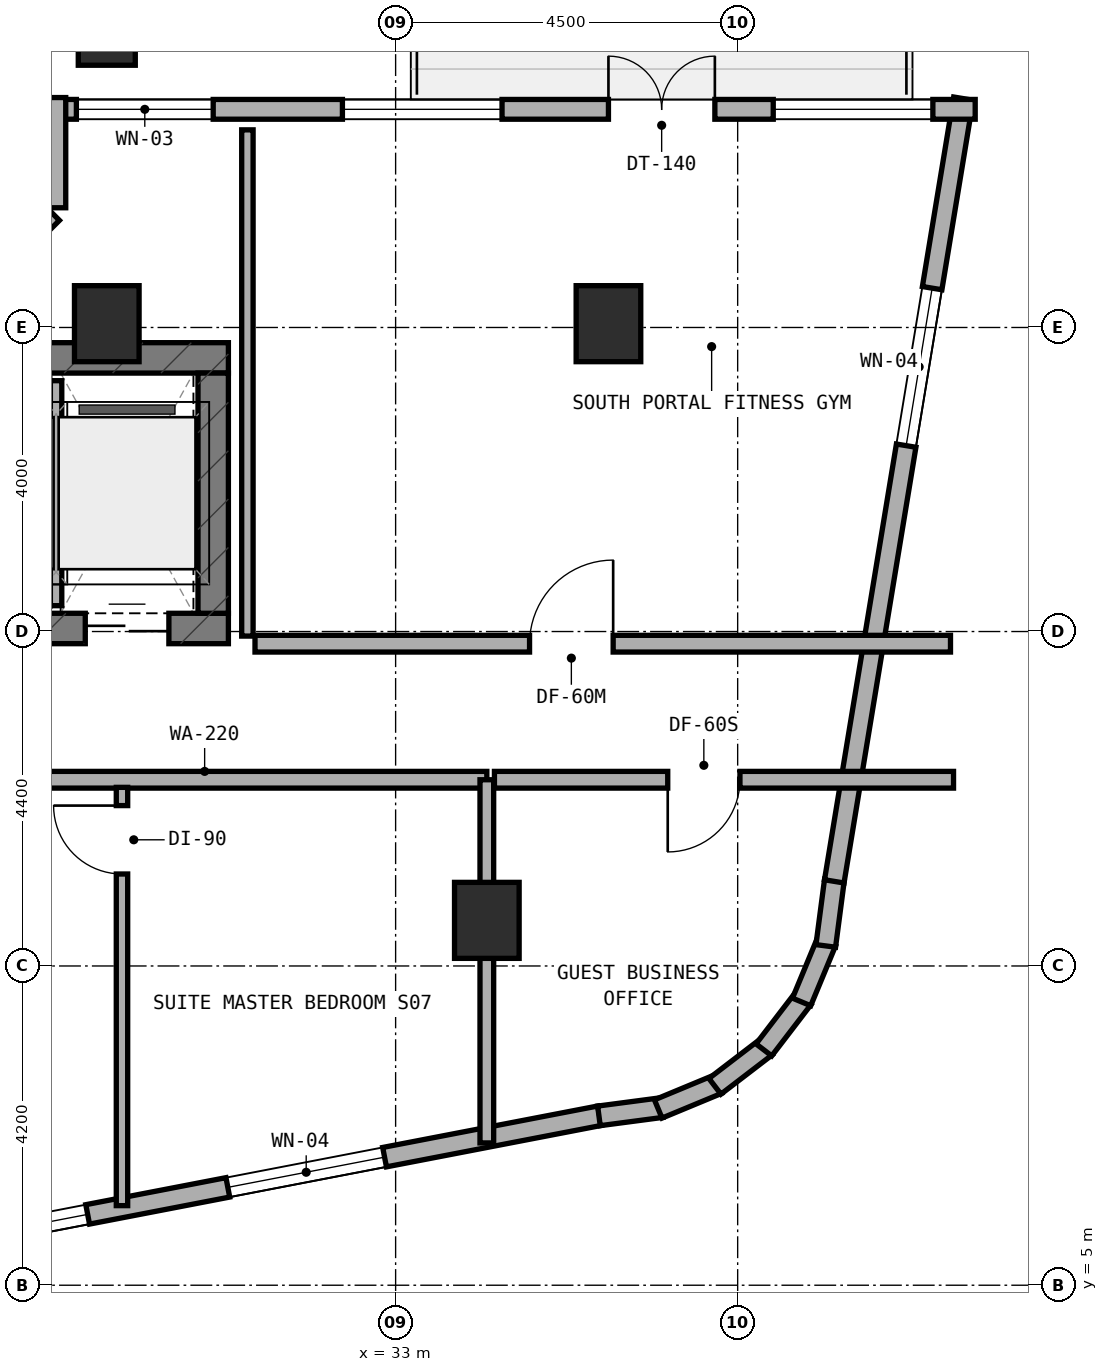
"""IFC4 building model, lengths in metres.
Left out: names, types, materials, properties, quantities, classifications, styles, units other than length and angle.
Written with IfcOpenShell. Run it as: python <this file> out.ifc"""

import sys

from ifc_helpers import new_model, si_unit, direction, frame, frame_2d, origin, origin_2d, place, context, subcontext, project, spatial, rectangle, extrude, element, fill, save


model = new_model("IFC4")
c1 = context("Model", 3, precision=1e-05, world=origin(), true_north=direction((0.0, 1.0)))
c2 = subcontext(c1, "Body", "Model", "MODEL_VIEW")
j1 = project(units=[si_unit("LENGTHUNIT", "METRE"), si_unit("PLANEANGLEUNIT", "RADIAN")], contexts=[c1])
p1 = place(None, origin())
s1 = spatial("IfcSite", under=j1, at=p1, CompositionType="ELEMENT")
p2 = place(p1, origin())
s2 = spatial("IfcBuilding", under=s1, at=p2, CompositionType="ELEMENT")
p3 = place(p2, frame((0.0, 0.0, 177.5)))
s3 = spatial("IfcBuildingStorey", under=s2, at=p3, CompositionType="ELEMENT", Elevation=177.5)
p4 = place(p3, frame((6.4, 13.64, 0.0), z_axis=(0.0, 0.0, 1.0), x_axis=(1.0, 0.0, 0.0)))
e1 = element("IfcWall", 1, at=p4, inside=s3, PredefinedType="SHEAR", context=c2, shape_type="SweptSolid", body=[
    extrude(rectangle(XDim=24.4, YDim=0.4, at=frame_2d((12.2, 0.0))), origin(), (0.0, 0.0, 1.0), 3.6),
])
p5 = place(p4, frame((9.15, 0.0, 0.0)))
e2 = element("IfcOpeningElement", 2, at=p5, cuts=e1, PredefinedType="OPENING", context=c2, shape_type="SweptSolid", body=[
    extrude(rectangle(XDim=1.2, YDim=2.15, at=frame_2d((0.6, 1.075))), frame((0.0, 0.21, 0.0), z_axis=(0.0, -1.0, 0.0), x_axis=(1.0, 0.0, 0.0)), (0.0, 0.0, 1.0), 0.42),
])
p6 = place(p4, frame((16.94, 0.0, 0.0)))
e3 = element("IfcOpeningElement", 3, at=p6, cuts=e1, PredefinedType="OPENING", context=c2, shape_type="SweptSolid", body=[
    extrude(rectangle(XDim=0.85, YDim=2.1, at=frame_2d((0.425, 1.05))), frame((0.0, 0.21, 0.0), z_axis=(0.0, -1.0, 0.0), x_axis=(1.0, 0.0, 0.0)), (0.0, 0.0, 1.0), 0.42),
])
p7 = place(p4, frame((18.783, 0.0, 0.0)))
e4 = element("IfcOpeningElement", 4, at=p7, cuts=e1, PredefinedType="OPENING", context=c2, shape_type="SweptSolid", body=[
    extrude(rectangle(XDim=1.1, YDim=2.15, at=frame_2d((0.55, 1.075))), frame((0.0, 0.21, 0.0), z_axis=(0.0, -1.0, 0.0), x_axis=(1.0, 0.0, 0.0)), (0.0, 0.0, 1.0), 0.42),
])
p8 = place(p4, frame((20.65, 0.0, 0.0)))
e5 = element("IfcOpeningElement", 5, at=p8, cuts=e1, PredefinedType="OPENING", context=c2, shape_type="SweptSolid", body=[
    extrude(rectangle(XDim=1.1, YDim=2.15, at=frame_2d((0.55, 1.075))), frame((0.0, 0.21, 0.0), z_axis=(0.0, -1.0, 0.0), x_axis=(1.0, 0.0, 0.0)), (0.0, 0.0, 1.0), 0.42),
])
p9 = place(p4, frame((22.517, 0.0, 0.0)))
e6 = element("IfcOpeningElement", 6, at=p9, cuts=e1, PredefinedType="OPENING", context=c2, shape_type="SweptSolid", body=[
    extrude(rectangle(XDim=1.1, YDim=2.15, at=frame_2d((0.55, 1.075))), frame((0.0, 0.21, 0.0), z_axis=(0.0, -1.0, 0.0), x_axis=(1.0, 0.0, 0.0)), (0.0, 0.0, 1.0), 0.42),
])
p10 = place(p3, frame((6.4, 17.2, 0.0), z_axis=(0.0, 0.0, 1.0), x_axis=(1.0, 0.0, 0.0)))
e7 = element("IfcWall", 7, at=p10, inside=s3, PredefinedType="SHEAR", context=c2, shape_type="SweptSolid", body=[
    extrude(rectangle(XDim=24.4, YDim=0.4, at=frame_2d((12.2, 0.0))), origin(), (0.0, 0.0, 1.0), 3.6),
])
p11 = place(p3, frame((30.6, 13.84, 0.0), z_axis=(0.0, 0.0, 1.0), x_axis=(0.0, 1.0, 0.0)))
e8 = element("IfcWall", 8, at=p11, inside=s3, PredefinedType="SHEAR", context=c2, shape_type="SweptSolid", body=[
    extrude(rectangle(XDim=3.16, YDim=0.4, at=frame_2d((1.58, 0.0))), origin(), (0.0, 0.0, 1.0), 3.6),
])
for number, where, z_axis, x_axis in (
    (9, (34.2, 9.8, 0.0), (0.0, 0.0, 1.0), (1.0, 0.0, 0.0)),
    (10, (35.8, 17.65, 0.0), (0.0, 0.0, 1.0), (1.0, 0.0, 0.0)),
    (11, (29.2, 17.65, 0.0), (0.0, 0.0, 1.0), (1.0, 0.0, 0.0)),
):
    element("IfcColumn", number, at=place(p3, frame(where, z_axis=z_axis, x_axis=x_axis)), inside=s3, PredefinedType="COLUMN", context=c2, shape_type="SweptSolid", body=[
        extrude(rectangle(XDim=0.85, YDim=1.0, at=origin_2d()), origin(), (0.0, 0.0, 1.0), 3.6),
    ])
p12 = place(p3, frame((29.2, 21.5, 0.0), z_axis=(0.0, 0.0, 1.0), x_axis=(1.0, 0.0, 0.0)))
e12 = element("IfcColumn", 12, at=p12, inside=s3, PredefinedType="COLUMN", context=c2, shape_type="SweptSolid", body=[
    extrude(rectangle(XDim=0.75, YDim=0.9, at=origin_2d()), origin(), (0.0, 0.0, 1.0), 3.6),
])
p13 = place(p3, frame((26.801, 5.518, 0.0), z_axis=(0.0, 0.0, 1.0), x_axis=(0.98192801022, 0.189254809039, 0.0)))
e13 = element("IfcWall", 13, at=p13, inside=s3, PredefinedType="STANDARD", context=c2, shape_type="SweptSolid", body=[
    extrude(rectangle(XDim=9.046, YDim=0.26, at=frame_2d((4.523, 0.0))), origin(), (0.0, 0.0, 1.0), 3.32),
])
p14 = place(p13, frame((0.387, 0.0, 0.85)))
e14 = element("IfcOpeningElement", 14, at=p14, cuts=e13, PredefinedType="OPENING", context=c2, shape_type="SweptSolid", body=[
    extrude(rectangle(XDim=1.8, YDim=1.5, at=frame_2d((0.9, 0.75))), frame((0.0, 0.14, 0.0), z_axis=(0.0, -1.0, 0.0), x_axis=(1.0, 0.0, 0.0)), (0.0, 0.0, 1.0), 0.28),
])
p15 = place(p13, frame((4.065, 0.0, 0.85)))
e15 = element("IfcOpeningElement", 15, at=p15, cuts=e13, PredefinedType="OPENING", context=c2, shape_type="SweptSolid", body=[
    extrude(rectangle(XDim=2.1, YDim=1.5, at=frame_2d((1.05, 0.75))), frame((0.0, 0.14, 0.0), z_axis=(0.0, -1.0, 0.0), x_axis=(1.0, 0.0, 0.0)), (0.0, 0.0, 1.0), 0.28),
])
p16 = place(p3, frame((35.675, 7.228, 0.0), z_axis=(0.0, 0.0, 1.0), x_axis=(0.99142134712, 0.130704676564, 0.0)))
e16 = element("IfcWall", 16, at=p16, inside=s3, PredefinedType="STANDARD", context=c2, shape_type="SweptSolid", body=[
    extrude(rectangle(XDim=0.833, YDim=0.26, at=frame_2d((0.417, 0.0))), origin(), (0.0, 0.0, 1.0), 3.32),
])
p17 = place(p3, frame((36.455, 7.319, 0.0), z_axis=(0.0, 0.0, 1.0), x_axis=(0.923712395518, 0.383086687796, 0.0)))
e17 = element("IfcWall", 17, at=p17, inside=s3, PredefinedType="STANDARD", context=c2, shape_type="SweptSolid", body=[
    extrude(rectangle(XDim=0.851, YDim=0.26, at=frame_2d((0.425, 0.0))), origin(), (0.0, 0.0, 1.0), 3.32),
])
for number, where, z_axis, x_axis in (
    (18, (37.201, 7.617, 0.0), (0.0, 0.0, 1.0), (0.794, 0.608, 0.0)),
    (19, (37.845, 8.096, 0.0), (0.0, 0.0, 1.0), (0.608, 0.794, 0.0)),
):
    element("IfcWall", number, at=place(p3, frame(where, z_axis=z_axis, x_axis=x_axis)), inside=s3, PredefinedType="STANDARD", context=c2, shape_type="SweptSolid", body=[
        extrude(rectangle(XDim=0.85, YDim=0.26, at=frame_2d((0.425, 0.0))), origin(), (0.0, 0.0, 1.0), 3.32),
    ])
p18 = place(p3, frame((38.341, 8.727, 0.0), z_axis=(0.0, 0.0, 1.0), x_axis=(0.383086687796, 0.923712395518, 0.0)))
e20 = element("IfcWall", 20, at=p18, inside=s3, PredefinedType="STANDARD", context=c2, shape_type="SweptSolid", body=[
    extrude(rectangle(XDim=0.851, YDim=0.26, at=frame_2d((0.425, 0.0))), origin(), (0.0, 0.0, 1.0), 3.32),
])
p19 = place(p3, frame((38.659, 9.464, 0.0), z_axis=(0.0, 0.0, 1.0), x_axis=(0.130192647656, 0.991488716273, 0.0)))
e21 = element("IfcWall", 21, at=p19, inside=s3, PredefinedType="STANDARD", context=c2, shape_type="SweptSolid", body=[
    extrude(rectangle(XDim=0.868, YDim=0.26, at=frame_2d((0.434, 0.0))), origin(), (0.0, 0.0, 1.0), 3.32),
])
p20 = place(p3, frame((38.771, 10.313, 0.0), z_axis=(0.0, 0.0, 1.0), x_axis=(0.16277908586, 0.986662540693, 0.0)))
e22 = element("IfcWall", 22, at=p20, inside=s3, PredefinedType="STANDARD", context=c2, shape_type="SweptSolid", body=[
    extrude(rectangle(XDim=10.437, YDim=0.26, at=frame_2d((5.219, 0.0))), origin(), (0.0, 0.0, 1.0), 3.32),
])
p21 = place(p20, frame((5.81, 0.0, 0.85)))
e23 = element("IfcOpeningElement", 23, at=p21, cuts=e22, PredefinedType="OPENING", context=c2, shape_type="SweptSolid", body=[
    extrude(rectangle(XDim=2.1, YDim=1.5, at=frame_2d((1.05, 0.75))), frame((0.0, 0.14, 0.0), z_axis=(0.0, -1.0, 0.0), x_axis=(1.0, 0.0, 0.0)), (0.0, 0.0, 1.0), 0.28),
])
p22 = place(p3, frame((40.625, 20.47, 0.0), z_axis=(0.0, 0.0, 1.0), x_axis=(-1.0, 0.0, 0.0)))
e24 = element("IfcWall", 24, at=p22, inside=s3, PredefinedType="STANDARD", context=c2, shape_type="SweptSolid", body=[
    extrude(rectangle(XDim=12.215, YDim=0.26, at=frame_2d((6.107, 0.0))), origin(), (0.0, 0.0, 1.0), 2.995),
])
p23 = place(p22, frame((3.425, 0.0, 0.0)))
e25 = element("IfcOpeningElement", 25, at=p23, cuts=e24, PredefinedType="OPENING", context=c2, shape_type="SweptSolid", body=[
    extrude(rectangle(XDim=1.4, YDim=2.15, at=frame_2d((0.7, 1.075))), frame((0.0, 0.14, 0.0), z_axis=(0.0, -1.0, 0.0), x_axis=(1.0, 0.0, 0.0)), (0.0, 0.0, 1.0), 0.28),
])
p24 = place(p22, frame((0.557, 0.0, 0.85)))
e26 = element("IfcOpeningElement", 26, at=p24, cuts=e24, PredefinedType="OPENING", context=c2, shape_type="SweptSolid", body=[
    extrude(rectangle(XDim=2.1, YDim=1.5, at=frame_2d((1.05, 0.75))), frame((0.0, 0.14, 0.0), z_axis=(0.0, -1.0, 0.0), x_axis=(1.0, 0.0, 0.0)), (0.0, 0.0, 1.0), 0.28),
])
p25 = place(p22, frame((6.225, 0.0, 0.85)))
e27 = element("IfcOpeningElement", 27, at=p25, cuts=e24, PredefinedType="OPENING", context=c2, shape_type="SweptSolid", body=[
    extrude(rectangle(XDim=2.1, YDim=1.5, at=frame_2d((1.05, 0.75))), frame((0.0, 0.14, 0.0), z_axis=(0.0, -1.0, 0.0), x_axis=(1.0, 0.0, 0.0)), (0.0, 0.0, 1.0), 0.28),
])
p26 = place(p22, frame((10.025, 0.0, 0.85)))
e28 = element("IfcOpeningElement", 28, at=p26, cuts=e24, PredefinedType="OPENING", context=c2, shape_type="SweptSolid", body=[
    extrude(rectangle(XDim=1.8, YDim=1.5, at=frame_2d((0.9, 0.75))), frame((0.0, 0.14, 0.0), z_axis=(0.0, -1.0, 0.0), x_axis=(1.0, 0.0, 0.0)), (0.0, 0.0, 1.0), 0.28),
])
p27 = place(p3, frame((28.53, 20.625, 0.0), z_axis=(0.0, 0.0, 1.0), x_axis=(0.0, -1.0, 0.0)))
e29 = element("IfcWall", 29, at=p27, inside=s3, PredefinedType="STANDARD", context=c2, shape_type="SweptSolid", body=[
    extrude(rectangle(XDim=1.45, YDim=0.26, at=frame_2d((0.725, 0.0))), origin(), (0.0, 0.0, 1.0), 3.32),
])
p28 = place(p3, frame((28.485, 19.101, 0.0), z_axis=(0.0, 0.0, 1.0), x_axis=(-0.707106781187, -0.707106781187, 0.0)))
e30 = element("IfcWall", 30, at=p28, inside=s3, PredefinedType="STANDARD", context=c2, shape_type="SweptSolid", body=[
    extrude(rectangle(XDim=2.493, YDim=0.26, at=frame_2d((1.247, 0.0))), origin(), (0.0, 0.0, 1.0), 3.32),
])
p29 = place(p28, frame((0.347, 0.0, 0.85)))
e31 = element("IfcOpeningElement", 31, at=p29, cuts=e30, PredefinedType="OPENING", context=c2, shape_type="SweptSolid", body=[
    extrude(rectangle(XDim=1.8, YDim=1.5, at=frame_2d((0.9, 0.75))), frame((0.0, 0.14, 0.0), z_axis=(0.0, -1.0, 0.0), x_axis=(1.0, 0.0, 0.0)), (0.0, 0.0, 1.0), 0.28),
])
p30 = place(p3, frame((28.533, 13.94, 0.0), z_axis=(0.0, 0.0, 1.0), x_axis=(0.0, 1.0, 0.0)))
e32 = element("IfcWall", 32, at=p30, inside=s3, PredefinedType="PARTITIONING", context=c2, shape_type="SweptSolid", body=[
    extrude(rectangle(XDim=2.96, YDim=0.15, at=frame_2d((1.48, 0.0))), origin(), (0.0, 0.0, 1.0), 2.995),
])
p31 = place(p3, frame((18.4, 11.65, 0.0), z_axis=(0.0, 0.0, 1.0), x_axis=(1.0, 0.0, 0.0)))
e33 = element("IfcWall", 33, at=p31, inside=s3, PredefinedType="SOLIDWALL", context=c2, shape_type="SweptSolid", body=[
    extrude(rectangle(XDim=15.8, YDim=0.22, at=frame_2d((7.9, 0.0))), origin(), (0.0, 0.0, 1.0), 2.995),
])
p32 = place(p31, frame((7.425, 0.0, 0.0)))
e34 = element("IfcOpeningElement", 34, at=p32, cuts=e33, PredefinedType="OPENING", context=c2, shape_type="SweptSolid", body=[
    extrude(rectangle(XDim=0.95, YDim=2.1, at=frame_2d((0.475, 1.05))), frame((0.0, 0.12, 0.0), z_axis=(0.0, -1.0, 0.0), x_axis=(1.0, 0.0, 0.0)), (0.0, 0.0, 1.0), 0.24),
])
p33 = place(p3, frame((29.4, 6.047, 0.0), z_axis=(0.0, 0.0, 1.0), x_axis=(0.0, 1.0, 0.0)))
e35 = element("IfcWall", 35, at=p33, inside=s3, PredefinedType="PARTITIONING", context=c2, shape_type="SweptSolid", body=[
    extrude(rectangle(XDim=5.503, YDim=0.15, at=frame_2d((2.751, 0.0))), origin(), (0.0, 0.0, 1.0), 2.845),
])
p34 = place(p33, frame((4.363, 0.0, 0.0)))
e36 = element("IfcOpeningElement", 36, at=p34, cuts=e35, PredefinedType="OPENING", context=c2, shape_type="SweptSolid", body=[
    extrude(rectangle(XDim=0.9, YDim=2.1, at=frame_2d((0.45, 1.05))), frame((0.0, 0.085, 0.0), z_axis=(0.0, -1.0, 0.0), x_axis=(1.0, 0.0, 0.0)), (0.0, 0.0, 1.0), 0.17),
])
p35 = place(p3, frame((34.2, 6.872, 0.0), z_axis=(0.0, 0.0, 1.0), x_axis=(0.0, 1.0, 0.0)))
e37 = element("IfcWall", 37, at=p35, inside=s3, PredefinedType="SOLIDWALL", context=c2, shape_type="SweptSolid", body=[
    extrude(rectangle(XDim=4.778, YDim=0.18, at=frame_2d((2.389, 0.0))), origin(), (0.0, 0.0, 1.0), 2.935),
])
p36 = place(p3, frame((34.3, 11.65, 0.0), z_axis=(0.0, 0.0, 1.0), x_axis=(1.0, 0.0, 0.0)))
e38 = element("IfcWall", 38, at=p36, inside=s3, PredefinedType="SOLIDWALL", context=c2, shape_type="SweptSolid", body=[
    extrude(rectangle(XDim=6.04, YDim=0.22, at=frame_2d((3.02, 0.0))), origin(), (0.0, 0.0, 1.0), 2.935),
])
p37 = place(p36, frame((2.28, 0.0, 0.0)))
e39 = element("IfcOpeningElement", 39, at=p37, cuts=e38, PredefinedType="OPENING", context=c2, shape_type="SweptSolid", body=[
    extrude(rectangle(XDim=0.95, YDim=2.1, at=frame_2d((0.475, 1.05))), frame((0.0, 0.12, 0.0), z_axis=(0.0, -1.0, 0.0), x_axis=(1.0, 0.0, 0.0)), (0.0, 0.0, 1.0), 0.24),
])
p38 = place(p3, frame((31.05, 13.54, 0.0), z_axis=(0.0, 0.0, 1.0), x_axis=(0.0, 1.0, 0.0)))
e40 = element("IfcWall", 40, at=p38, inside=s3, PredefinedType="PARTITIONING", context=c2, shape_type="SweptSolid", body=[
    extrude(rectangle(XDim=6.66, YDim=0.15, at=frame_2d((3.33, 0.0))), origin(), (0.0, 0.0, 1.0), 2.995),
])
p39 = place(p3, frame((31.15, 13.44, 0.0), z_axis=(0.0, 0.0, 1.0), x_axis=(1.0, 0.0, 0.0)))
e41 = element("IfcWall", 41, at=p39, inside=s3, PredefinedType="SOLIDWALL", context=c2, shape_type="SweptSolid", body=[
    extrude(rectangle(XDim=9.15, YDim=0.22, at=frame_2d((4.575, 0.0))), origin(), (0.0, 0.0, 1.0), 2.935),
])
p40 = place(p39, frame((3.612, 0.0, 0.0)))
e42 = element("IfcOpeningElement", 42, at=p40, cuts=e41, PredefinedType="OPENING", context=c2, shape_type="SweptSolid", body=[
    extrude(rectangle(XDim=1.1, YDim=2.1, at=frame_2d((0.55, 1.05))), frame((0.0, 0.12, 0.0), z_axis=(0.0, -1.0, 0.0), x_axis=(1.0, 0.0, 0.0)), (0.0, 0.0, 1.0), 0.24),
])
p41 = place(p14, origin())
e43 = element("IfcWindow", 43, at=p41, inside=s3, PartitioningType="SINGLE_PANEL", PredefinedType="WINDOW", context=c2, shape_type="SweptSolid", body=[
    extrude(rectangle(XDim=1.8, YDim=1.5, at=frame_2d((0.9, 0.75))), frame((0.0, 0.03, 0.0), z_axis=(0.0, -1.0, 0.0), x_axis=(1.0, 0.0, 0.0)), (0.0, 0.0, 1.0), 0.06),
])
fill(e14, e43)
p42 = place(p15, origin())
e44 = element("IfcWindow", 44, at=p42, inside=s3, PartitioningType="SINGLE_PANEL", PredefinedType="WINDOW", context=c2, shape_type="SweptSolid", body=[
    extrude(rectangle(XDim=2.1, YDim=1.5, at=frame_2d((1.05, 0.75))), frame((0.0, 0.03, 0.0), z_axis=(0.0, -1.0, 0.0), x_axis=(1.0, 0.0, 0.0)), (0.0, 0.0, 1.0), 0.06),
])
fill(e15, e44)
p43 = place(p21, origin())
e45 = element("IfcWindow", 45, at=p43, inside=s3, PartitioningType="SINGLE_PANEL", PredefinedType="WINDOW", context=c2, shape_type="SweptSolid", body=[
    extrude(rectangle(XDim=2.1, YDim=1.5, at=frame_2d((1.05, 0.75))), frame((0.0, 0.03, 0.0), z_axis=(0.0, -1.0, 0.0), x_axis=(1.0, 0.0, 0.0)), (0.0, 0.0, 1.0), 0.06),
])
fill(e23, e45)
p44 = place(p23, frame((1.4, 0.0, 0.0), z_axis=(0.0, 0.0, 1.0), x_axis=(-1.0, 0.0, 0.0)))
e46 = element("IfcDoor", 46, at=p44, inside=s3, OperationType="DOUBLE_DOOR_SINGLE_SWING", PredefinedType="DOOR", context=c2, shape_type="SweptSolid", body=[
    extrude(rectangle(XDim=1.4, YDim=2.15, at=frame_2d((0.7, 1.075))), frame((0.0, 0.025, 0.0), z_axis=(0.0, -1.0, 0.0), x_axis=(1.0, 0.0, 0.0)), (0.0, 0.0, 1.0), 0.05),
])
fill(e25, e46)
p45 = place(p24, origin())
e47 = element("IfcWindow", 47, at=p45, inside=s3, PartitioningType="SINGLE_PANEL", PredefinedType="WINDOW", context=c2, shape_type="SweptSolid", body=[
    extrude(rectangle(XDim=2.1, YDim=1.5, at=frame_2d((1.05, 0.75))), frame((0.0, 0.03, 0.0), z_axis=(0.0, -1.0, 0.0), x_axis=(1.0, 0.0, 0.0)), (0.0, 0.0, 1.0), 0.06),
])
fill(e26, e47)
p46 = place(p25, origin())
e48 = element("IfcWindow", 48, at=p46, inside=s3, PartitioningType="SINGLE_PANEL", PredefinedType="WINDOW", context=c2, shape_type="SweptSolid", body=[
    extrude(rectangle(XDim=2.1, YDim=1.5, at=frame_2d((1.05, 0.75))), frame((0.0, 0.03, 0.0), z_axis=(0.0, -1.0, 0.0), x_axis=(1.0, 0.0, 0.0)), (0.0, 0.0, 1.0), 0.06),
])
fill(e27, e48)
p47 = place(p26, origin())
e49 = element("IfcWindow", 49, at=p47, inside=s3, PartitioningType="SINGLE_PANEL", PredefinedType="WINDOW", context=c2, shape_type="SweptSolid", body=[
    extrude(rectangle(XDim=1.8, YDim=1.5, at=frame_2d((0.9, 0.75))), frame((0.0, 0.03, 0.0), z_axis=(0.0, -1.0, 0.0), x_axis=(1.0, 0.0, 0.0)), (0.0, 0.0, 1.0), 0.06),
])
fill(e28, e49)
p48 = place(p9, frame((1.1, 0.0, 0.0), z_axis=(0.0, 0.0, 1.0), x_axis=(-1.0, 0.0, 0.0)))
e50 = element("IfcDoor", 50, at=p48, inside=s3, OperationType="DOUBLE_DOOR_SLIDING", PredefinedType="DOOR", context=c2, shape_type="SweptSolid", body=[
    extrude(rectangle(XDim=1.1, YDim=2.15, at=frame_2d((0.55, 1.075))), frame((0.0, 0.025, 0.0), z_axis=(0.0, -1.0, 0.0), x_axis=(1.0, 0.0, 0.0)), (0.0, 0.0, 1.0), 0.05),
])
fill(e6, e50)
p49 = place(p34, origin())
e51 = element("IfcDoor", 51, at=p49, inside=s3, OperationType="SINGLE_SWING_RIGHT", PredefinedType="DOOR", context=c2, shape_type="SweptSolid", body=[
    extrude(rectangle(XDim=0.9, YDim=2.1, at=frame_2d((0.45, 1.05))), frame((0.0, 0.025, 0.0), z_axis=(0.0, -1.0, 0.0), x_axis=(1.0, 0.0, 0.0)), (0.0, 0.0, 1.0), 0.05),
])
fill(e36, e51)
p50 = place(p37, frame((0.95, 0.0, 0.0), z_axis=(0.0, 0.0, 1.0), x_axis=(-1.0, 0.0, 0.0)))
e52 = element("IfcDoor", 52, at=p50, inside=s3, OperationType="SINGLE_SWING_RIGHT", PredefinedType="DOOR", context=c2, shape_type="SweptSolid", body=[
    extrude(rectangle(XDim=0.95, YDim=2.1, at=frame_2d((0.475, 1.05))), frame((0.0, 0.025, 0.0), z_axis=(0.0, -1.0, 0.0), x_axis=(1.0, 0.0, 0.0)), (0.0, 0.0, 1.0), 0.05),
])
fill(e39, e52)
p51 = place(p40, origin())
e53 = element("IfcDoor", 53, at=p51, inside=s3, OperationType="SINGLE_SWING_RIGHT", PredefinedType="DOOR", context=c2, shape_type="SweptSolid", body=[
    extrude(rectangle(XDim=1.1, YDim=2.1, at=frame_2d((0.55, 1.05))), frame((0.0, 0.025, 0.0), z_axis=(0.0, -1.0, 0.0), x_axis=(1.0, 0.0, 0.0)), (0.0, 0.0, 1.0), 0.05),
])
fill(e42, e53)
save(model, sys.argv[1])
